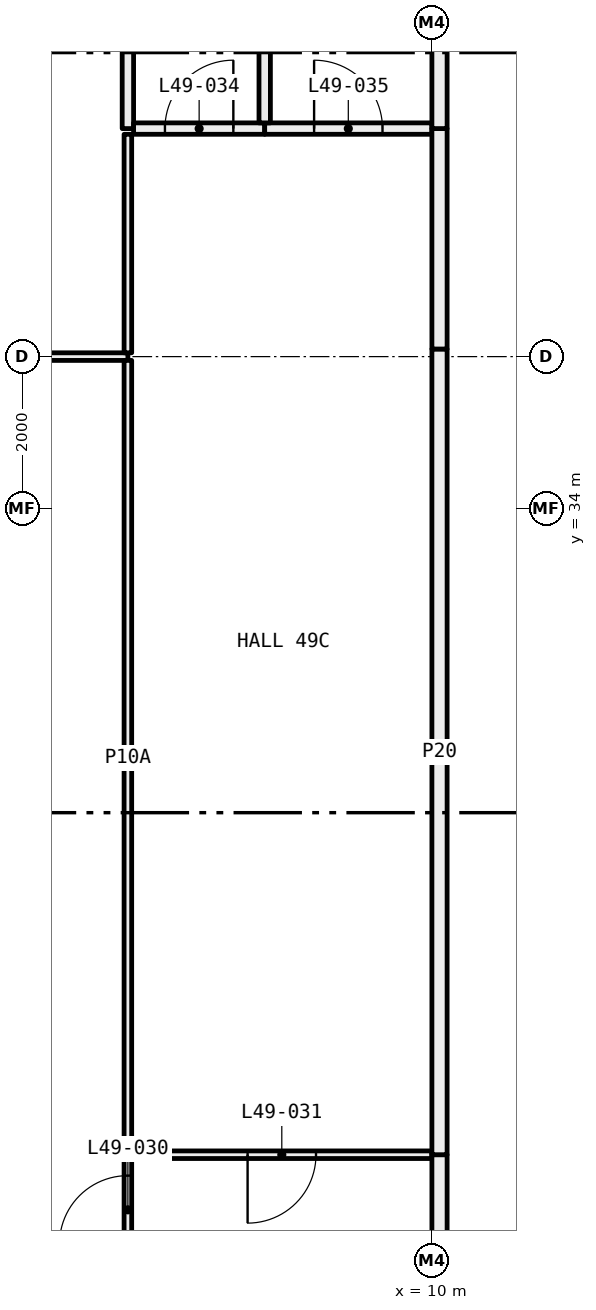
"""IFC4 building model, lengths in metres.
Left out: names, types, materials, properties, quantities, classifications, styles, units other than length and angle.
Written with IfcOpenShell. Run it as: python <this file> out.ifc"""

import sys

from ifc_helpers import new_model, si_unit, direction, frame, frame_2d, origin, place, context, subcontext, project, spatial, rectangle, extrude, element, fill, save


model = new_model("IFC4")
c1 = context("Model", 3, precision=1e-05, world=origin(), true_north=direction((0.0, 1.0)))
c2 = subcontext(c1, "Body", "Model", "MODEL_VIEW")
j1 = project(units=[si_unit("LENGTHUNIT", "METRE"), si_unit("PLANEANGLEUNIT", "RADIAN")], contexts=[c1])
p1 = place(None, origin())
s1 = spatial("IfcSite", under=j1, at=p1, CompositionType="ELEMENT")
p2 = place(p1, origin())
s2 = spatial("IfcBuilding", under=s1, at=p2, CompositionType="ELEMENT")
p3 = place(p2, frame((0.0, 0.0, 185.85)))
s3 = spatial("IfcBuildingStorey", under=s2, at=p3, CompositionType="ELEMENT", Elevation=185.85)
p4 = place(p3, frame((6.0, 36.0, 0.0), z_axis=(0.0, 0.0, 1.0), x_axis=(-1.0, 0.0, 0.0)))
e1 = element("IfcWall", 1, at=p4, inside=s3, PredefinedType="PARTITIONING", context=c2, shape_type="SweptSolid", body=[
    extrude(rectangle(XDim=5.28, YDim=0.1, at=frame_2d((2.64, 0.0))), origin(), (0.0, 0.0, 1.0), 2.45),
])
p5 = place(p4, frame((2.19, 0.0, 0.0)))
e2 = element("IfcOpeningElement", 2, at=p5, cuts=e1, PredefinedType="OPENING", context=c2, shape_type="SweptSolid", body=[
    extrude(rectangle(XDim=0.9, YDim=2.1, at=frame_2d((0.45, 1.05))), frame((0.0, 0.06, 0.0), z_axis=(0.0, -1.0, 0.0), x_axis=(1.0, 0.0, 0.0)), (0.0, 0.0, 1.0), 0.12),
])
p6 = place(p3, frame((6.0, 24.05, 0.0), z_axis=(0.0, 0.0, 1.0), x_axis=(0.0, 1.0, 0.0)))
e3 = element("IfcWall", 3, at=p6, inside=s3, PredefinedType="PARTITIONING", context=c2, shape_type="SweptSolid", body=[
    extrude(rectangle(XDim=1.45, YDim=0.1, at=frame_2d((0.725, 0.0))), origin(), (0.0, 0.0, 1.0), 2.45),
])
p7 = place(p6, frame((0.275, 0.0, 0.0)))
e4 = element("IfcOpeningElement", 4, at=p7, cuts=e3, PredefinedType="OPENING", context=c2, shape_type="SweptSolid", body=[
    extrude(rectangle(XDim=0.9, YDim=2.1, at=frame_2d((0.45, 1.05))), frame((0.0, 0.06, 0.0), z_axis=(0.0, -1.0, 0.0), x_axis=(1.0, 0.0, 0.0)), (0.0, 0.0, 1.0), 0.12),
])
p8 = place(p3, frame((6.0, 25.5, 0.0), z_axis=(0.0, 0.0, 1.0), x_axis=(0.0, 1.0, 0.0)))
e5 = element("IfcWall", 5, at=p8, inside=s3, PredefinedType="PARTITIONING", context=c2, shape_type="SweptSolid", body=[
    extrude(rectangle(XDim=10.45, YDim=0.1, at=frame_2d((5.225, 0.0))), origin(), (0.0, 0.0, 1.0), 2.45),
])
p9 = place(p3, frame((6.0, 36.05, 0.0), z_axis=(0.0, 0.0, 1.0), x_axis=(0.0, 1.0, 0.0)))
e6 = element("IfcWall", 6, at=p9, inside=s3, PredefinedType="PARTITIONING", context=c2, shape_type="SweptSolid", body=[
    extrude(rectangle(XDim=2.875, YDim=0.1, at=frame_2d((1.438, 0.0))), origin(), (0.0, 0.0, 1.0), 2.45),
])
p10 = place(p3, frame((6.0, 39.0, 0.0), z_axis=(0.0, 0.0, 1.0), x_axis=(0.0, 1.0, 0.0)))
e7 = element("IfcWall", 7, at=p10, inside=s3, PredefinedType="PARTITIONING", context=c2, shape_type="SweptSolid", body=[
    extrude(rectangle(XDim=2.28, YDim=0.15, at=frame_2d((1.14, 0.0))), origin(), (0.0, 0.0, 1.0), 3.05),
])
p11 = place(p3, frame((10.0, 25.5, 0.0), z_axis=(0.0, 0.0, 1.0), x_axis=(-1.0, 0.0, 0.0)))
e8 = element("IfcWall", 8, at=p11, inside=s3, PredefinedType="PARTITIONING", context=c2, shape_type="SweptSolid", body=[
    extrude(rectangle(XDim=3.95, YDim=0.1, at=frame_2d((1.975, 0.0))), origin(), (0.0, 0.0, 1.0), 3.05),
])
p12 = place(p11, frame((1.525, 0.0, 0.0)))
e9 = element("IfcOpeningElement", 9, at=p12, cuts=e8, PredefinedType="OPENING", context=c2, shape_type="SweptSolid", body=[
    extrude(rectangle(XDim=0.9, YDim=2.1, at=frame_2d((0.45, 1.05))), frame((0.0, 0.06, 0.0), z_axis=(0.0, -1.0, 0.0), x_axis=(1.0, 0.0, 0.0)), (0.0, 0.0, 1.0), 0.12),
])
p13 = place(p3, frame((10.1, 24.1, 0.0), z_axis=(0.0, 0.0, 1.0), x_axis=(0.0, 1.0, 0.0)))
e10 = element("IfcWall", 10, at=p13, inside=s3, PredefinedType="PARTITIONING", context=c2, shape_type="SweptSolid", body=[
    extrude(rectangle(XDim=1.4, YDim=0.2, at=frame_2d((0.7, 0.0))), origin(), (0.0, 0.0, 1.0), 3.05),
])
p14 = place(p3, frame((7.8, 39.0, 0.0), z_axis=(0.0, 0.0, 1.0), x_axis=(-1.0, 0.0, 0.0)))
e11 = element("IfcWall", 11, at=p14, inside=s3, PredefinedType="PARTITIONING", context=c2, shape_type="SweptSolid", body=[
    extrude(rectangle(XDim=1.725, YDim=0.15, at=frame_2d((0.863, 0.0))), origin(), (0.0, 0.0, 1.0), 3.05),
])
p15 = place(p14, frame((0.413, 0.0, 0.0)))
e12 = element("IfcOpeningElement", 12, at=p15, cuts=e11, PredefinedType="OPENING", context=c2, shape_type="SweptSolid", body=[
    extrude(rectangle(XDim=0.9, YDim=2.1, at=frame_2d((0.45, 1.05))), frame((0.0, 0.085, 0.0), z_axis=(0.0, -1.0, 0.0), x_axis=(1.0, 0.0, 0.0)), (0.0, 0.0, 1.0), 0.17),
])
p16 = place(p3, frame((10.0, 39.0, 0.0), z_axis=(0.0, 0.0, 1.0), x_axis=(-1.0, 0.0, 0.0)))
e13 = element("IfcWall", 13, at=p16, inside=s3, PredefinedType="PARTITIONING", context=c2, shape_type="SweptSolid", body=[
    extrude(rectangle(XDim=2.2, YDim=0.15, at=frame_2d((1.1, 0.0))), origin(), (0.0, 0.0, 1.0), 3.05),
])
p17 = place(p16, frame((0.65, 0.0, 0.0)))
e14 = element("IfcOpeningElement", 14, at=p17, cuts=e13, PredefinedType="OPENING", context=c2, shape_type="SweptSolid", body=[
    extrude(rectangle(XDim=0.9, YDim=2.1, at=frame_2d((0.45, 1.05))), frame((0.0, 0.085, 0.0), z_axis=(0.0, -1.0, 0.0), x_axis=(1.0, 0.0, 0.0)), (0.0, 0.0, 1.0), 0.17),
])
p18 = place(p3, frame((10.1, 25.5, 0.0), z_axis=(0.0, 0.0, 1.0), x_axis=(0.0, 1.0, 0.0)))
e15 = element("IfcWall", 15, at=p18, inside=s3, PredefinedType="PARTITIONING", context=c2, shape_type="SweptSolid", body=[
    extrude(rectangle(XDim=10.6, YDim=0.2, at=frame_2d((5.3, 0.0))), origin(), (0.0, 0.0, 1.0), 2.45),
])
p19 = place(p3, frame((10.1, 36.1, 0.0), z_axis=(0.0, 0.0, 1.0), x_axis=(0.0, 1.0, 0.0)))
e16 = element("IfcWall", 16, at=p19, inside=s3, PredefinedType="PARTITIONING", context=c2, shape_type="SweptSolid", body=[
    extrude(rectangle(XDim=2.9, YDim=0.2, at=frame_2d((1.45, 0.0))), origin(), (0.0, 0.0, 1.0), 3.05),
])
p20 = place(p3, frame((7.8, 39.075, 0.0), z_axis=(0.0, 0.0, 1.0), x_axis=(0.0, 1.0, 0.0)))
e17 = element("IfcWall", 17, at=p20, inside=s3, PredefinedType="PARTITIONING", context=c2, shape_type="SweptSolid", body=[
    extrude(rectangle(XDim=2.825, YDim=0.15, at=frame_2d((1.413, 0.0))), origin(), (0.0, 0.0, 1.0), 3.05),
])
p21 = place(p3, frame((10.1, 39.0, 0.0), z_axis=(0.0, 0.0, 1.0), x_axis=(0.0, 1.0, 0.0)))
e18 = element("IfcWall", 18, at=p21, inside=s3, PredefinedType="PARTITIONING", context=c2, shape_type="SweptSolid", body=[
    extrude(rectangle(XDim=2.9, YDim=0.2, at=frame_2d((1.45, 0.0))), origin(), (0.0, 0.0, 1.0), 3.05),
])
p22 = place(p7, origin())
e19 = element("IfcDoor", 19, at=p22, inside=s3, OperationType="SINGLE_SWING_RIGHT", PredefinedType="DOOR", context=c2, shape_type="SweptSolid", body=[
    extrude(rectangle(XDim=0.9, YDim=2.1, at=frame_2d((0.45, 1.05))), frame((0.0, 0.025, 0.0), z_axis=(0.0, -1.0, 0.0), x_axis=(1.0, 0.0, 0.0)), (0.0, 0.0, 1.0), 0.05),
])
fill(e4, e19)
p23 = place(p12, origin())
e20 = element("IfcDoor", 20, at=p23, inside=s3, OperationType="SINGLE_SWING_LEFT", PredefinedType="DOOR", context=c2, shape_type="SweptSolid", body=[
    extrude(rectangle(XDim=0.9, YDim=2.1, at=frame_2d((0.45, 1.05))), frame((0.0, 0.025, 0.0), z_axis=(0.0, -1.0, 0.0), x_axis=(1.0, 0.0, 0.0)), (0.0, 0.0, 1.0), 0.05),
])
fill(e9, e20)
p24 = place(p15, frame((0.9, 0.0, 0.0), x_axis=(-1.0, 0.0, 0.0)))
e21 = element("IfcDoor", 21, at=p24, inside=s3, OperationType="SINGLE_SWING_LEFT", PredefinedType="DOOR", context=c2, shape_type="SweptSolid", body=[
    extrude(rectangle(XDim=0.9, YDim=2.1, at=frame_2d((0.45, 1.05))), frame((0.0, 0.025, 0.0), z_axis=(0.0, -1.0, 0.0), x_axis=(1.0, 0.0, 0.0)), (0.0, 0.0, 1.0), 0.05),
])
fill(e12, e21)
p25 = place(p17, frame((0.9, 0.0, 0.0), x_axis=(-1.0, 0.0, 0.0)))
e22 = element("IfcDoor", 22, at=p25, inside=s3, OperationType="SINGLE_SWING_RIGHT", PredefinedType="DOOR", context=c2, shape_type="SweptSolid", body=[
    extrude(rectangle(XDim=0.9, YDim=2.1, at=frame_2d((0.45, 1.05))), frame((0.0, 0.025, 0.0), z_axis=(0.0, -1.0, 0.0), x_axis=(1.0, 0.0, 0.0)), (0.0, 0.0, 1.0), 0.05),
])
fill(e14, e22)
save(model, sys.argv[1])
